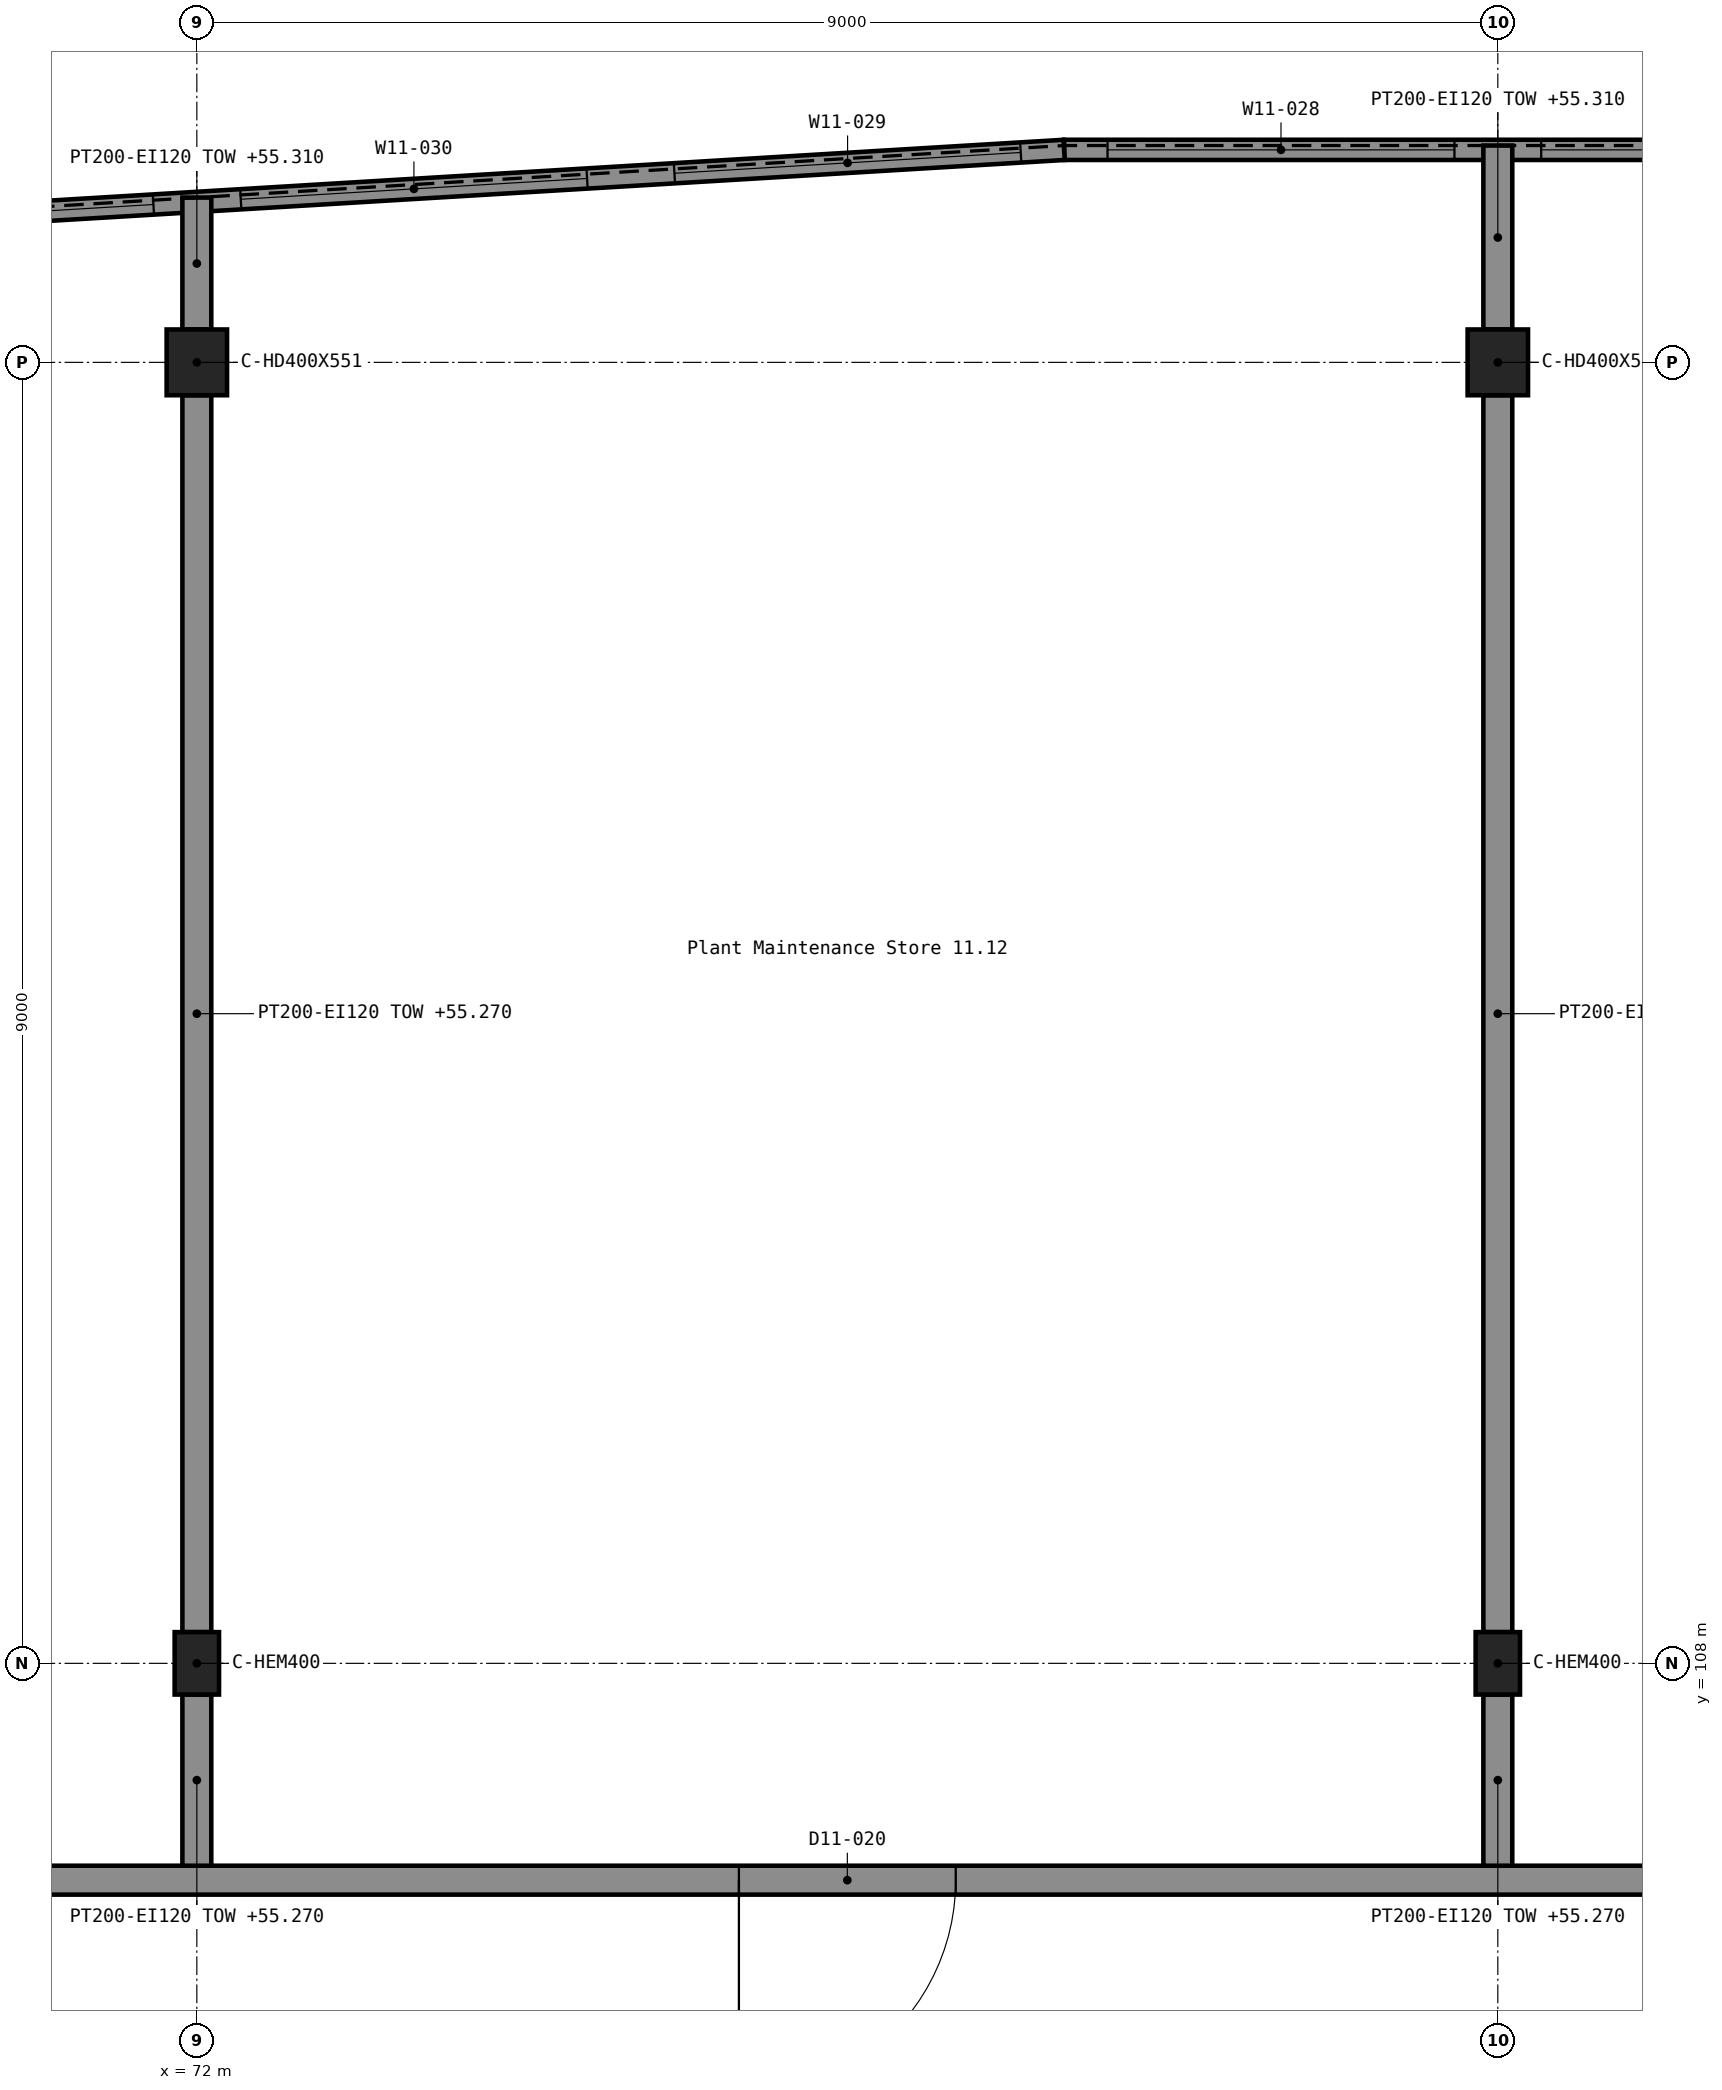
"""IFC4 building model, lengths in metres.
Left out: names, types, materials, properties, quantities, classifications, styles, units other than length and angle.
Written with IfcOpenShell. Run it as: python <this file> out.ifc"""

import sys

from ifc_helpers import new_model, si_unit, direction, frame, frame_2d, origin, origin_2d, place, context, subcontext, project, spatial, rectangle, i_section, extrude, element, fill, save


model = new_model("IFC4")
c1 = context("Model", 3, precision=1e-05, world=origin(), true_north=direction((0.0, 1.0)))
c2 = subcontext(c1, "Body", "Model", "MODEL_VIEW")
j1 = project(units=[si_unit("LENGTHUNIT", "METRE"), si_unit("PLANEANGLEUNIT", "RADIAN")], contexts=[c1])
p1 = place(None, origin())
s1 = spatial("IfcSite", under=j1, at=p1, CompositionType="ELEMENT")
p2 = place(p1, origin())
s2 = spatial("IfcBuilding", under=s1, at=p2, CompositionType="ELEMENT")
p3 = place(p2, frame((0.0, 0.0, 51.9)))
s3 = spatial("IfcBuildingStorey", under=s2, at=p3, CompositionType="ELEMENT", Elevation=51.9)
for number, where, z_axis, x_axis in (
    (1, (72.0, 108.0, 0.0), (0.0, 0.0, 1.0), (1.0, 0.0, 0.0)),
    (2, (81.0, 108.0, 0.0), (0.0, 0.0, 1.0), (1.0, 0.0, 0.0)),
):
    element("IfcColumn", number, at=place(p3, frame(where, z_axis=z_axis, x_axis=x_axis)), inside=s3, PredefinedType="COLUMN", context=c2, shape_type="SweptSolid", body=[
        extrude(i_section(OverallWidth=0.307, OverallDepth=0.432, WebThickness=0.021, FlangeThickness=0.04, FilletRadius=0.027, at=origin_2d()), origin(), (0.0, 0.0, 1.0), 3.9),
    ])
for number, where, z_axis, x_axis in (
    (3, (72.0, 117.0, 0.0), (0.0, 0.0, 1.0), (1.0, 0.0, 0.0)),
    (4, (81.0, 117.0, 0.0), (0.0, 0.0, 1.0), (1.0, 0.0, 0.0)),
):
    element("IfcColumn", number, at=place(p3, frame(where, z_axis=z_axis, x_axis=x_axis)), inside=s3, PredefinedType="COLUMN", context=c2, shape_type="SweptSolid", body=[
        extrude(i_section(OverallWidth=0.418, OverallDepth=0.455, WebThickness=0.042, FlangeThickness=0.068, FilletRadius=0.015, at=origin_2d()), origin(), (0.0, 0.0, 1.0), 3.9),
    ])
p4 = place(p3, frame((92.998, 118.47, 0.0), z_axis=(0.0, 0.0, 1.0), x_axis=(-1.0, 0.0, 0.0)))
e5 = element("IfcWall", 5, at=p4, inside=s3, PredefinedType="SOLIDWALL", context=c2, shape_type="SweptSolid", body=[
    extrude(rectangle(XDim=14.998, YDim=0.14, at=frame_2d((7.499, 0.0))), origin(), (0.0, 0.0, 1.0), 3.9),
])
p5 = place(p4, frame((0.298, 0.0, 0.6)))
e6 = element("IfcOpeningElement", 6, at=p5, cuts=e5, PredefinedType="OPENING", context=c2, shape_type="SweptSolid", body=[
    extrude(rectangle(XDim=2.4, YDim=2.4, at=frame_2d((1.2, 1.2))), frame((0.0, 0.081, 0.0), z_axis=(0.0, -1.0, 0.0), x_axis=(1.0, 0.0, 0.0)), (0.0, 0.0, 1.0), 0.162),
])
p6 = place(p4, frame((3.298, 0.0, 0.6)))
e7 = element("IfcOpeningElement", 7, at=p6, cuts=e5, PredefinedType="OPENING", context=c2, shape_type="SweptSolid", body=[
    extrude(rectangle(XDim=2.4, YDim=2.4, at=frame_2d((1.2, 1.2))), frame((0.0, 0.081, 0.0), z_axis=(0.0, -1.0, 0.0), x_axis=(1.0, 0.0, 0.0)), (0.0, 0.0, 1.0), 0.162),
])
p7 = place(p4, frame((6.298, 0.0, 0.6)))
e8 = element("IfcOpeningElement", 8, at=p7, cuts=e5, PredefinedType="OPENING", context=c2, shape_type="SweptSolid", body=[
    extrude(rectangle(XDim=2.4, YDim=2.4, at=frame_2d((1.2, 1.2))), frame((0.0, 0.081, 0.0), z_axis=(0.0, -1.0, 0.0), x_axis=(1.0, 0.0, 0.0)), (0.0, 0.0, 1.0), 0.162),
])
p8 = place(p4, frame((9.298, 0.0, 0.6)))
e9 = element("IfcOpeningElement", 9, at=p8, cuts=e5, PredefinedType="OPENING", context=c2, shape_type="SweptSolid", body=[
    extrude(rectangle(XDim=2.4, YDim=2.4, at=frame_2d((1.2, 1.2))), frame((0.0, 0.081, 0.0), z_axis=(0.0, -1.0, 0.0), x_axis=(1.0, 0.0, 0.0)), (0.0, 0.0, 1.0), 0.162),
])
p9 = place(p4, frame((12.298, 0.0, 0.6)))
e10 = element("IfcOpeningElement", 10, at=p9, cuts=e5, PredefinedType="OPENING", context=c2, shape_type="SweptSolid", body=[
    extrude(rectangle(XDim=2.4, YDim=2.4, at=frame_2d((1.2, 1.2))), frame((0.0, 0.081, 0.0), z_axis=(0.0, -1.0, 0.0), x_axis=(1.0, 0.0, 0.0)), (0.0, 0.0, 1.0), 0.162),
])
p10 = place(p3, frame((78.0, 118.47, 0.0), z_axis=(0.0, 0.0, 1.0), x_axis=(-0.998204826037, -0.059892614536, 0.0)))
e11 = element("IfcWall", 11, at=p10, inside=s3, PredefinedType="SOLIDWALL", context=c2, shape_type="SweptSolid", body=[
    extrude(rectangle(XDim=15.025, YDim=0.14, at=frame_2d((7.513, 0.0))), origin(), (0.0, 0.0, 1.0), 3.9),
])
p11 = place(p10, frame((0.301, 0.0, 0.6)))
e12 = element("IfcOpeningElement", 12, at=p11, cuts=e11, PredefinedType="OPENING", context=c2, shape_type="SweptSolid", body=[
    extrude(rectangle(XDim=2.4, YDim=2.4, at=frame_2d((1.2, 1.2))), frame((0.0, 0.081, 0.0), z_axis=(0.0, -1.0, 0.0), x_axis=(1.0, 0.0, 0.0)), (0.0, 0.0, 1.0), 0.162),
])
p12 = place(p10, frame((3.306, 0.0, 0.6)))
e13 = element("IfcOpeningElement", 13, at=p12, cuts=e11, PredefinedType="OPENING", context=c2, shape_type="SweptSolid", body=[
    extrude(rectangle(XDim=2.4, YDim=2.4, at=frame_2d((1.2, 1.2))), frame((0.0, 0.081, 0.0), z_axis=(0.0, -1.0, 0.0), x_axis=(1.0, 0.0, 0.0)), (0.0, 0.0, 1.0), 0.162),
])
p13 = place(p10, frame((6.312, 0.0, 0.6)))
e14 = element("IfcOpeningElement", 14, at=p13, cuts=e11, PredefinedType="OPENING", context=c2, shape_type="SweptSolid", body=[
    extrude(rectangle(XDim=2.4, YDim=2.4, at=frame_2d((1.2, 1.2))), frame((0.0, 0.081, 0.0), z_axis=(0.0, -1.0, 0.0), x_axis=(1.0, 0.0, 0.0)), (0.0, 0.0, 1.0), 0.162),
])
p14 = place(p10, frame((9.317, 0.0, 0.6)))
e15 = element("IfcOpeningElement", 15, at=p14, cuts=e11, PredefinedType="OPENING", context=c2, shape_type="SweptSolid", body=[
    extrude(rectangle(XDim=2.4, YDim=2.4, at=frame_2d((1.2, 1.2))), frame((0.0, 0.081, 0.0), z_axis=(0.0, -1.0, 0.0), x_axis=(1.0, 0.0, 0.0)), (0.0, 0.0, 1.0), 0.162),
])
p15 = place(p10, frame((12.323, 0.0, 0.6)))
e16 = element("IfcOpeningElement", 16, at=p15, cuts=e11, PredefinedType="OPENING", context=c2, shape_type="SweptSolid", body=[
    extrude(rectangle(XDim=2.4, YDim=2.4, at=frame_2d((1.2, 1.2))), frame((0.0, 0.081, 0.0), z_axis=(0.0, -1.0, 0.0), x_axis=(1.0, 0.0, 0.0)), (0.0, 0.0, 1.0), 0.162),
])
p16 = place(p3, frame((66.0, 106.5, 0.0), z_axis=(0.0, 0.0, 1.0), x_axis=(1.0, 0.0, 0.0)))
e17 = element("IfcWall", 17, at=p16, inside=s3, PredefinedType="PARTITIONING", context=c2, shape_type="SweptSolid", body=[
    extrude(rectangle(XDim=39.0, YDim=0.2, at=frame_2d((19.5, 0.0))), origin(), (0.0, 0.0, 1.0), 3.77),
])
p17 = place(p16, frame((2.25, 0.0, 0.0)))
e18 = element("IfcOpeningElement", 18, at=p17, cuts=e17, PredefinedType="OPENING", context=c2, shape_type="SweptSolid", body=[
    extrude(rectangle(XDim=1.5, YDim=2.4, at=frame_2d((0.75, 1.2))), frame((0.0, 0.111, 0.0), z_axis=(0.0, -1.0, 0.0), x_axis=(1.0, 0.0, 0.0)), (0.0, 0.0, 1.0), 0.222),
])
p18 = place(p16, frame((9.75, 0.0, 0.0)))
e19 = element("IfcOpeningElement", 19, at=p18, cuts=e17, PredefinedType="OPENING", context=c2, shape_type="SweptSolid", body=[
    extrude(rectangle(XDim=1.5, YDim=2.4, at=frame_2d((0.75, 1.2))), frame((0.0, 0.111, 0.0), z_axis=(0.0, -1.0, 0.0), x_axis=(1.0, 0.0, 0.0)), (0.0, 0.0, 1.0), 0.222),
])
p19 = place(p16, frame((24.375, 0.0, 0.0)))
e20 = element("IfcOpeningElement", 20, at=p19, cuts=e17, PredefinedType="OPENING", context=c2, shape_type="SweptSolid", body=[
    extrude(rectangle(XDim=1.5, YDim=2.4, at=frame_2d((0.75, 1.2))), frame((0.0, 0.111, 0.0), z_axis=(0.0, -1.0, 0.0), x_axis=(1.0, 0.0, 0.0)), (0.0, 0.0, 1.0), 0.222),
])
p20 = place(p16, frame((35.25, 0.0, 0.0)))
e21 = element("IfcOpeningElement", 21, at=p20, cuts=e17, PredefinedType="OPENING", context=c2, shape_type="SweptSolid", body=[
    extrude(rectangle(XDim=1.5, YDim=2.4, at=frame_2d((0.75, 1.2))), frame((0.0, 0.111, 0.0), z_axis=(0.0, -1.0, 0.0), x_axis=(1.0, 0.0, 0.0)), (0.0, 0.0, 1.0), 0.222),
])
p21 = place(p3, frame((72.0, 106.6, 0.0), z_axis=(0.0, 0.0, 1.0), x_axis=(0.0, 1.0, 0.0)))
e22 = element("IfcWall", 22, at=p21, inside=s3, PredefinedType="PARTITIONING", context=c2, shape_type="SweptSolid", body=[
    extrude(rectangle(XDim=1.184, YDim=0.2, at=frame_2d((0.592, 0.0))), origin(), (0.0, 0.0, 1.0), 3.37),
])
p22 = place(p3, frame((72.0, 108.216, 0.0), z_axis=(0.0, 0.0, 1.0), x_axis=(0.0, 1.0, 0.0)))
e23 = element("IfcWall", 23, at=p22, inside=s3, PredefinedType="PARTITIONING", context=c2, shape_type="SweptSolid", body=[
    extrude(rectangle(XDim=8.556, YDim=0.2, at=frame_2d((4.278, 0.0))), origin(), (0.0, 0.0, 1.0), 3.37),
])
p23 = place(p3, frame((72.0, 117.228, 0.0), z_axis=(0.0, 0.0, 1.0), x_axis=(0.0, 1.0, 0.0)))
e24 = element("IfcWall", 24, at=p23, inside=s3, PredefinedType="PARTITIONING", context=c2, shape_type="SweptSolid", body=[
    extrude(rectangle(XDim=0.912, YDim=0.2, at=frame_2d((0.456, 0.0))), origin(), (0.0, 0.0, 1.0), 3.41),
])
p24 = place(p3, frame((81.0, 106.6, 0.0), z_axis=(0.0, 0.0, 1.0), x_axis=(0.0, 1.0, 0.0)))
e25 = element("IfcWall", 25, at=p24, inside=s3, PredefinedType="PARTITIONING", context=c2, shape_type="SweptSolid", body=[
    extrude(rectangle(XDim=1.184, YDim=0.2, at=frame_2d((0.592, 0.0))), origin(), (0.0, 0.0, 1.0), 3.37),
])
p25 = place(p3, frame((81.0, 108.216, 0.0), z_axis=(0.0, 0.0, 1.0), x_axis=(0.0, 1.0, 0.0)))
e26 = element("IfcWall", 26, at=p25, inside=s3, PredefinedType="PARTITIONING", context=c2, shape_type="SweptSolid", body=[
    extrude(rectangle(XDim=8.556, YDim=0.2, at=frame_2d((4.278, 0.0))), origin(), (0.0, 0.0, 1.0), 3.37),
])
p26 = place(p3, frame((81.0, 117.228, 0.0), z_axis=(0.0, 0.0, 1.0), x_axis=(0.0, 1.0, 0.0)))
e27 = element("IfcWall", 27, at=p26, inside=s3, PredefinedType="PARTITIONING", context=c2, shape_type="SweptSolid", body=[
    extrude(rectangle(XDim=1.272, YDim=0.2, at=frame_2d((0.636, 0.0))), origin(), (0.0, 0.0, 1.0), 3.41),
])
p27 = place(p8, origin())
e28 = element("IfcWindow", 28, at=p27, inside=s3, PartitioningType="SINGLE_PANEL", PredefinedType="WINDOW", context=c2, shape_type="SweptSolid", body=[
    extrude(rectangle(XDim=2.4, YDim=2.4, at=frame_2d((1.2, 1.2))), frame((0.0, 0.03, 0.0), z_axis=(0.0, -1.0, 0.0), x_axis=(1.0, 0.0, 0.0)), (0.0, 0.0, 1.0), 0.06),
])
fill(e9, e28)
p28 = place(p9, origin())
e29 = element("IfcWindow", 29, at=p28, inside=s3, PartitioningType="SINGLE_PANEL", PredefinedType="WINDOW", context=c2, shape_type="SweptSolid", body=[
    extrude(rectangle(XDim=2.4, YDim=2.4, at=frame_2d((1.2, 1.2))), frame((0.0, 0.03, 0.0), z_axis=(0.0, -1.0, 0.0), x_axis=(1.0, 0.0, 0.0)), (0.0, 0.0, 1.0), 0.06),
])
fill(e10, e29)
p29 = place(p11, origin())
e30 = element("IfcWindow", 30, at=p29, inside=s3, PartitioningType="SINGLE_PANEL", PredefinedType="WINDOW", context=c2, shape_type="SweptSolid", body=[
    extrude(rectangle(XDim=2.4, YDim=2.4, at=frame_2d((1.2, 1.2))), frame((0.0, 0.03, 0.0), z_axis=(0.0, -1.0, 0.0), x_axis=(1.0, 0.0, 0.0)), (0.0, 0.0, 1.0), 0.06),
])
fill(e12, e30)
p30 = place(p12, origin())
e31 = element("IfcWindow", 31, at=p30, inside=s3, PartitioningType="SINGLE_PANEL", PredefinedType="WINDOW", context=c2, shape_type="SweptSolid", body=[
    extrude(rectangle(XDim=2.4, YDim=2.4, at=frame_2d((1.2, 1.2))), frame((0.0, 0.03, 0.0), z_axis=(0.0, -1.0, 0.0), x_axis=(1.0, 0.0, 0.0)), (0.0, 0.0, 1.0), 0.06),
])
fill(e13, e31)
p31 = place(p13, origin())
e32 = element("IfcWindow", 32, at=p31, inside=s3, PartitioningType="SINGLE_PANEL", PredefinedType="WINDOW", context=c2, shape_type="SweptSolid", body=[
    extrude(rectangle(XDim=2.4, YDim=2.4, at=frame_2d((1.2, 1.2))), frame((0.0, 0.03, 0.0), z_axis=(0.0, -1.0, 0.0), x_axis=(1.0, 0.0, 0.0)), (0.0, 0.0, 1.0), 0.06),
])
fill(e14, e32)
p32 = place(p18, frame((1.5, 0.0, 0.0), z_axis=(0.0, 0.0, 1.0), x_axis=(-1.0, 0.0, 0.0)))
e33 = element("IfcDoor", 33, at=p32, inside=s3, OperationType="DOUBLE_DOOR_SINGLE_SWING", PredefinedType="DOOR", context=c2, shape_type="SweptSolid", body=[
    extrude(rectangle(XDim=1.5, YDim=2.4, at=frame_2d((0.75, 1.2))), frame((0.0, 0.025, 0.0), z_axis=(0.0, -1.0, 0.0), x_axis=(1.0, 0.0, 0.0)), (0.0, 0.0, 1.0), 0.05),
])
fill(e19, e33)
save(model, sys.argv[1])
